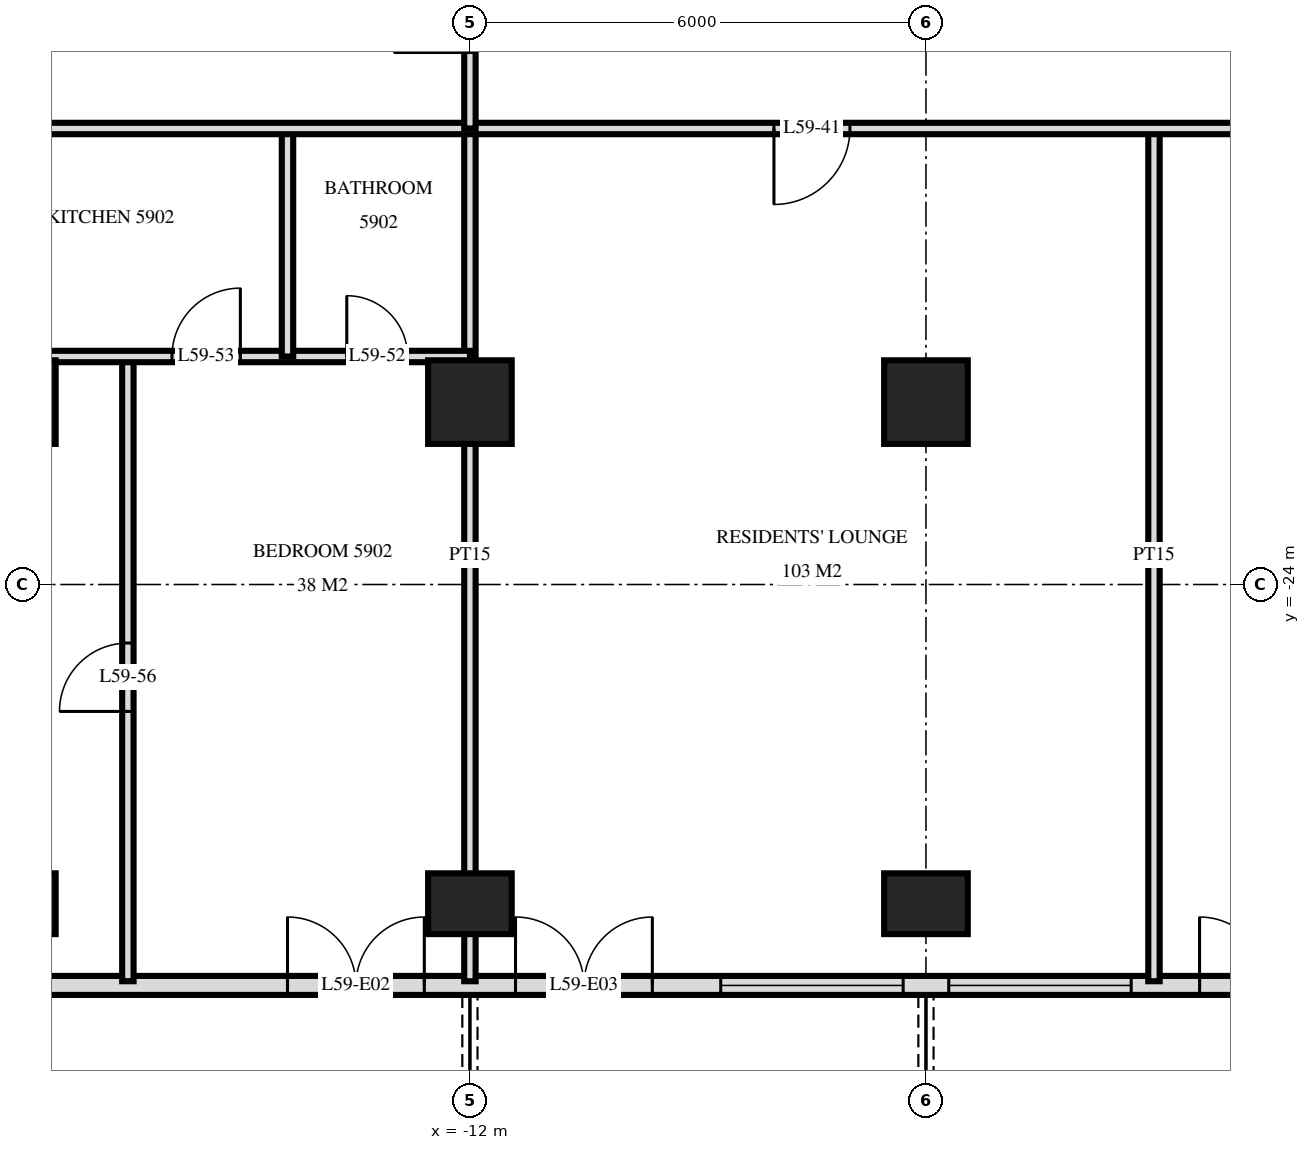
"""IFC4 building model, lengths in metres.
Left out: names, types, materials, properties, quantities, classifications, styles, units other than length and angle.
Written with IfcOpenShell. Run it as: python <this file> out.ifc"""

import sys

from ifc_helpers import new_model, si_unit, direction, frame, frame_2d, origin, origin_2d, place, context, subcontext, project, spatial, rectangle, extrude, element, fill, save


model = new_model("IFC4")
c1 = context("Model", 3, precision=1e-05, world=origin(), true_north=direction((0.0, 1.0)))
c2 = subcontext(c1, "Body", "Model", "MODEL_VIEW")
j1 = project(units=[si_unit("LENGTHUNIT", "METRE"), si_unit("PLANEANGLEUNIT", "RADIAN")], contexts=[c1])
p1 = place(None, origin())
s1 = spatial("IfcSite", under=j1, at=p1, CompositionType="ELEMENT")
p2 = place(p1, origin())
s2 = spatial("IfcBuilding", under=s1, at=p2, CompositionType="ELEMENT")
p3 = place(p2, frame((0.0, 0.0, 225.6)))
s3 = spatial("IfcBuildingStorey", under=s2, at=p3, CompositionType="ELEMENT", Elevation=225.6)
p4 = place(p3, frame((-18.0, -28.2, 0.0), z_axis=(0.0, 0.0, 1.0), x_axis=(1.0, 0.0, 0.0)))
e1 = element("IfcColumn", 1, at=p4, inside=s3, PredefinedType="COLUMN", context=c2, shape_type="SweptSolid", body=[
    extrude(rectangle(XDim=1.1, YDim=0.8, at=origin_2d()), origin(), (0.0, 0.0, 1.0), 3.5),
])
p5 = place(p3, frame((-18.0, -21.6, 0.0), z_axis=(0.0, 0.0, 1.0), x_axis=(1.0, 0.0, 0.0)))
e2 = element("IfcColumn", 2, at=p5, inside=s3, PredefinedType="COLUMN", context=c2, shape_type="SweptSolid", body=[
    extrude(rectangle(XDim=1.1, YDim=1.1, at=origin_2d()), origin(), (0.0, 0.0, 1.0), 3.5),
])
p6 = place(p3, frame((-12.0, -28.2, 0.0), z_axis=(0.0, 0.0, 1.0), x_axis=(1.0, 0.0, 0.0)))
e3 = element("IfcColumn", 3, at=p6, inside=s3, PredefinedType="COLUMN", context=c2, shape_type="SweptSolid", body=[
    extrude(rectangle(XDim=1.1, YDim=0.8, at=origin_2d()), origin(), (0.0, 0.0, 1.0), 3.5),
])
p7 = place(p3, frame((-12.0, -21.6, 0.0), z_axis=(0.0, 0.0, 1.0), x_axis=(1.0, 0.0, 0.0)))
e4 = element("IfcColumn", 4, at=p7, inside=s3, PredefinedType="COLUMN", context=c2, shape_type="SweptSolid", body=[
    extrude(rectangle(XDim=1.1, YDim=1.1, at=origin_2d()), origin(), (0.0, 0.0, 1.0), 3.5),
])
p8 = place(p3, frame((-6.0, -28.2, 0.0), z_axis=(0.0, 0.0, 1.0), x_axis=(1.0, 0.0, 0.0)))
e5 = element("IfcColumn", 5, at=p8, inside=s3, PredefinedType="COLUMN", context=c2, shape_type="SweptSolid", body=[
    extrude(rectangle(XDim=1.1, YDim=0.8, at=origin_2d()), origin(), (0.0, 0.0, 1.0), 3.5),
])
p9 = place(p3, frame((-6.0, -21.6, 0.0), z_axis=(0.0, 0.0, 1.0), x_axis=(1.0, 0.0, 0.0)))
e6 = element("IfcColumn", 6, at=p9, inside=s3, PredefinedType="COLUMN", context=c2, shape_type="SweptSolid", body=[
    extrude(rectangle(XDim=1.1, YDim=1.1, at=origin_2d()), origin(), (0.0, 0.0, 1.0), 3.5),
])
p10 = place(p3, frame((-22.475, -29.275, 0.0), z_axis=(0.0, 0.0, 1.0), x_axis=(1.0, 0.0, 0.0)))
e7 = element("IfcWall", 7, at=p10, inside=s3, PredefinedType="SOLIDWALL", context=c2, shape_type="SweptSolid", body=[
    extrude(rectangle(XDim=44.951, YDim=0.25, at=frame_2d((22.475, 0.0))), origin(), (0.0, 0.0, 1.0), 3.22),
])
p11 = place(p10, frame((0.575, 0.0, 0.0)))
e8 = element("IfcOpeningElement", 8, at=p11, cuts=e7, PredefinedType="OPENING", context=c2, shape_type="SweptSolid", body=[
    extrude(rectangle(XDim=1.8, YDim=2.4, at=frame_2d((0.9, 1.2))), frame((0.0, 0.135, 0.0), z_axis=(0.0, -1.0, 0.0), x_axis=(1.0, 0.0, 0.0)), (0.0, 0.0, 1.0), 0.27),
])
p12 = place(p10, frame((8.075, 0.0, 0.0)))
e9 = element("IfcOpeningElement", 9, at=p12, cuts=e7, PredefinedType="OPENING", context=c2, shape_type="SweptSolid", body=[
    extrude(rectangle(XDim=1.8, YDim=2.4, at=frame_2d((0.9, 1.2))), frame((0.0, 0.135, 0.0), z_axis=(0.0, -1.0, 0.0), x_axis=(1.0, 0.0, 0.0)), (0.0, 0.0, 1.0), 0.27),
])
p13 = place(p10, frame((11.075, 0.0, 0.0)))
e10 = element("IfcOpeningElement", 10, at=p13, cuts=e7, PredefinedType="OPENING", context=c2, shape_type="SweptSolid", body=[
    extrude(rectangle(XDim=1.8, YDim=2.4, at=frame_2d((0.9, 1.2))), frame((0.0, 0.135, 0.0), z_axis=(0.0, -1.0, 0.0), x_axis=(1.0, 0.0, 0.0)), (0.0, 0.0, 1.0), 0.27),
])
p14 = place(p10, frame((13.775, 0.0, 0.9)))
e11 = element("IfcOpeningElement", 11, at=p14, cuts=e7, PredefinedType="OPENING", context=c2, shape_type="SweptSolid", body=[
    extrude(rectangle(XDim=2.4, YDim=1.5, at=frame_2d((1.2, 0.75))), frame((0.0, 0.135, 0.0), z_axis=(0.0, -1.0, 0.0), x_axis=(1.0, 0.0, 0.0)), (0.0, 0.0, 1.0), 0.27),
])
p15 = place(p10, frame((16.775, 0.0, 0.9)))
e12 = element("IfcOpeningElement", 12, at=p15, cuts=e7, PredefinedType="OPENING", context=c2, shape_type="SweptSolid", body=[
    extrude(rectangle(XDim=2.4, YDim=1.5, at=frame_2d((1.2, 0.75))), frame((0.0, 0.135, 0.0), z_axis=(0.0, -1.0, 0.0), x_axis=(1.0, 0.0, 0.0)), (0.0, 0.0, 1.0), 0.27),
])
p16 = place(p10, frame((20.075, 0.0, 0.0)))
e13 = element("IfcOpeningElement", 13, at=p16, cuts=e7, PredefinedType="OPENING", context=c2, shape_type="SweptSolid", body=[
    extrude(rectangle(XDim=1.8, YDim=2.4, at=frame_2d((0.9, 1.2))), frame((0.0, 0.135, 0.0), z_axis=(0.0, -1.0, 0.0), x_axis=(1.0, 0.0, 0.0)), (0.0, 0.0, 1.0), 0.27),
])
p17 = place(p10, frame((23.075, 0.0, 0.0)))
e14 = element("IfcOpeningElement", 14, at=p17, cuts=e7, PredefinedType="OPENING", context=c2, shape_type="SweptSolid", body=[
    extrude(rectangle(XDim=1.8, YDim=2.4, at=frame_2d((0.9, 1.2))), frame((0.0, 0.135, 0.0), z_axis=(0.0, -1.0, 0.0), x_axis=(1.0, 0.0, 0.0)), (0.0, 0.0, 1.0), 0.27),
])
p18 = place(p10, frame((25.775, 0.0, 0.9)))
e15 = element("IfcOpeningElement", 15, at=p18, cuts=e7, PredefinedType="OPENING", context=c2, shape_type="SweptSolid", body=[
    extrude(rectangle(XDim=2.4, YDim=1.5, at=frame_2d((1.2, 0.75))), frame((0.0, 0.135, 0.0), z_axis=(0.0, -1.0, 0.0), x_axis=(1.0, 0.0, 0.0)), (0.0, 0.0, 1.0), 0.27),
])
p19 = place(p10, frame((29.075, 0.0, 0.0)))
e16 = element("IfcOpeningElement", 16, at=p19, cuts=e7, PredefinedType="OPENING", context=c2, shape_type="SweptSolid", body=[
    extrude(rectangle(XDim=1.8, YDim=2.4, at=frame_2d((0.9, 1.2))), frame((0.0, 0.135, 0.0), z_axis=(0.0, -1.0, 0.0), x_axis=(1.0, 0.0, 0.0)), (0.0, 0.0, 1.0), 0.27),
])
p20 = place(p10, frame((31.775, 0.0, 0.9)))
e17 = element("IfcOpeningElement", 17, at=p20, cuts=e7, PredefinedType="OPENING", context=c2, shape_type="SweptSolid", body=[
    extrude(rectangle(XDim=2.4, YDim=1.5, at=frame_2d((1.2, 0.75))), frame((0.0, 0.135, 0.0), z_axis=(0.0, -1.0, 0.0), x_axis=(1.0, 0.0, 0.0)), (0.0, 0.0, 1.0), 0.27),
])
p21 = place(p10, frame((35.075, 0.0, 0.0)))
e18 = element("IfcOpeningElement", 18, at=p21, cuts=e7, PredefinedType="OPENING", context=c2, shape_type="SweptSolid", body=[
    extrude(rectangle(XDim=1.8, YDim=2.4, at=frame_2d((0.9, 1.2))), frame((0.0, 0.135, 0.0), z_axis=(0.0, -1.0, 0.0), x_axis=(1.0, 0.0, 0.0)), (0.0, 0.0, 1.0), 0.27),
])
p22 = place(p10, frame((37.775, 0.0, 0.9)))
e19 = element("IfcOpeningElement", 19, at=p22, cuts=e7, PredefinedType="OPENING", context=c2, shape_type="SweptSolid", body=[
    extrude(rectangle(XDim=2.4, YDim=1.5, at=frame_2d((1.2, 0.75))), frame((0.0, 0.135, 0.0), z_axis=(0.0, -1.0, 0.0), x_axis=(1.0, 0.0, 0.0)), (0.0, 0.0, 1.0), 0.27),
])
p23 = place(p10, frame((41.075, 0.0, 0.0)))
e20 = element("IfcOpeningElement", 20, at=p23, cuts=e7, PredefinedType="OPENING", context=c2, shape_type="SweptSolid", body=[
    extrude(rectangle(XDim=1.8, YDim=2.4, at=frame_2d((0.9, 1.2))), frame((0.0, 0.135, 0.0), z_axis=(0.0, -1.0, 0.0), x_axis=(1.0, 0.0, 0.0)), (0.0, 0.0, 1.0), 0.27),
])
p24 = place(p3, frame((-3.0, -29.22, 0.0), z_axis=(0.0, 0.0, 1.0), x_axis=(0.0, 1.0, 0.0)))
e21 = element("IfcWall", 21, at=p24, inside=s3, PredefinedType="PARTITIONING", context=c2, shape_type="SweptSolid", body=[
    extrude(rectangle(XDim=11.22, YDim=0.15, at=frame_2d((5.61, 0.0))), origin(), (0.0, 0.0, 1.0), 3.22),
])
p25 = place(p3, frame((-12.0, -18.0, 0.0), z_axis=(0.0, 0.0, 1.0), x_axis=(0.0, 1.0, 0.0)))
e22 = element("IfcWall", 22, at=p25, inside=s3, PredefinedType="PARTITIONING", context=c2, shape_type="SweptSolid", body=[
    extrude(rectangle(XDim=2.95, YDim=0.15, at=frame_2d((1.475, 0.0))), origin(), (0.0, 0.0, 1.0), 3.22),
])
p26 = place(p25, frame((1.0, 0.0, 0.0)))
e23 = element("IfcOpeningElement", 23, at=p26, cuts=e22, PredefinedType="OPENING", context=c2, shape_type="SweptSolid", body=[
    extrude(rectangle(XDim=1.0, YDim=2.1, at=frame_2d((0.5, 1.05))), frame((0.0, 0.085, 0.0), z_axis=(0.0, -1.0, 0.0), x_axis=(1.0, 0.0, 0.0)), (0.0, 0.0, 1.0), 0.17),
])
p27 = place(p3, frame((-12.0, -29.22, 0.0), z_axis=(0.0, 0.0, 1.0), x_axis=(0.0, 1.0, 0.0)))
e24 = element("IfcWall", 24, at=p27, inside=s3, PredefinedType="PARTITIONING", context=c2, shape_type="SweptSolid", body=[
    extrude(rectangle(XDim=11.22, YDim=0.15, at=frame_2d((5.61, 0.0))), origin(), (0.0, 0.0, 1.0), 3.22),
])
p28 = place(p3, frame((-14.4, -21.0, 0.0), z_axis=(0.0, 0.0, 1.0), x_axis=(0.0, 1.0, 0.0)))
e25 = element("IfcWall", 25, at=p28, inside=s3, PredefinedType="PARTITIONING", context=c2, shape_type="SweptSolid", body=[
    extrude(rectangle(XDim=3.0, YDim=0.15, at=frame_2d((1.5, 0.0))), origin(), (0.0, 0.0, 1.0), 3.22),
])
p29 = place(p3, frame((-16.5, -29.22, 0.0), z_axis=(0.0, 0.0, 1.0), x_axis=(0.0, 1.0, 0.0)))
e26 = element("IfcWall", 26, at=p29, inside=s3, PredefinedType="PARTITIONING", context=c2, shape_type="SweptSolid", body=[
    extrude(rectangle(XDim=8.22, YDim=0.15, at=frame_2d((4.11, 0.0))), origin(), (0.0, 0.0, 1.0), 3.22),
])
p30 = place(p29, frame((3.55, 0.0, 0.0)))
e27 = element("IfcOpeningElement", 27, at=p30, cuts=e26, PredefinedType="OPENING", context=c2, shape_type="SweptSolid", body=[
    extrude(rectangle(XDim=0.9, YDim=2.1, at=frame_2d((0.45, 1.05))), frame((0.0, 0.085, 0.0), z_axis=(0.0, -1.0, 0.0), x_axis=(1.0, 0.0, 0.0)), (0.0, 0.0, 1.0), 0.17),
])
p31 = place(p3, frame((-20.4, -21.0, 0.0), z_axis=(0.0, 0.0, 1.0), x_axis=(1.0, 0.0, 0.0)))
e28 = element("IfcWall", 28, at=p31, inside=s3, PredefinedType="PARTITIONING", context=c2, shape_type="SweptSolid", body=[
    extrude(rectangle(XDim=8.4, YDim=0.15, at=frame_2d((4.2, 0.0))), origin(), (0.0, 0.0, 1.0), 3.22),
])
p32 = place(p31, frame((6.78, 0.0, 0.0)))
e29 = element("IfcOpeningElement", 29, at=p32, cuts=e28, PredefinedType="OPENING", context=c2, shape_type="SweptSolid", body=[
    extrude(rectangle(XDim=0.8, YDim=2.1, at=frame_2d((0.4, 1.05))), frame((0.0, 0.085, 0.0), z_axis=(0.0, -1.0, 0.0), x_axis=(1.0, 0.0, 0.0)), (0.0, 0.0, 1.0), 0.17),
])
p33 = place(p31, frame((4.48, 0.0, 0.0)))
e30 = element("IfcOpeningElement", 30, at=p33, cuts=e28, PredefinedType="OPENING", context=c2, shape_type="SweptSolid", body=[
    extrude(rectangle(XDim=0.9, YDim=2.1, at=frame_2d((0.45, 1.05))), frame((0.0, 0.085, 0.0), z_axis=(0.0, -1.0, 0.0), x_axis=(1.0, 0.0, 0.0)), (0.0, 0.0, 1.0), 0.17),
])
p34 = place(p3, frame((-26.82, -18.0, 0.0), z_axis=(0.0, 0.0, 1.0), x_axis=(1.0, 0.0, 0.0)))
e31 = element("IfcWall", 31, at=p34, inside=s3, PredefinedType="PARTITIONING", context=c2, shape_type="SweptSolid", body=[
    extrude(rectangle(XDim=53.64, YDim=0.15, at=frame_2d((26.82, 0.0))), origin(), (0.0, 0.0, 1.0), 3.22),
])
p35 = place(p34, frame((4.92, 0.0, 0.0)))
e32 = element("IfcOpeningElement", 32, at=p35, cuts=e31, PredefinedType="OPENING", context=c2, shape_type="SweptSolid", body=[
    extrude(rectangle(XDim=1.0, YDim=2.1, at=frame_2d((0.5, 1.05))), frame((0.0, 0.085, 0.0), z_axis=(0.0, -1.0, 0.0), x_axis=(1.0, 0.0, 0.0)), (0.0, 0.0, 1.0), 0.17),
])
p36 = place(p34, frame((1.62, 0.0, 0.0)))
e33 = element("IfcOpeningElement", 33, at=p36, cuts=e31, PredefinedType="OPENING", context=c2, shape_type="SweptSolid", body=[
    extrude(rectangle(XDim=1.0, YDim=2.1, at=frame_2d((0.5, 1.05))), frame((0.0, 0.085, 0.0), z_axis=(0.0, -1.0, 0.0), x_axis=(1.0, 0.0, 0.0)), (0.0, 0.0, 1.0), 0.17),
])
p37 = place(p34, frame((38.97, 0.0, 0.0)))
e34 = element("IfcOpeningElement", 34, at=p37, cuts=e31, PredefinedType="OPENING", context=c2, shape_type="SweptSolid", body=[
    extrude(rectangle(XDim=1.0, YDim=2.1, at=frame_2d((0.5, 1.05))), frame((0.0, 0.085, 0.0), z_axis=(0.0, -1.0, 0.0), x_axis=(1.0, 0.0, 0.0)), (0.0, 0.0, 1.0), 0.17),
])
p38 = place(p34, frame((48.72, 0.0, 0.0)))
e35 = element("IfcOpeningElement", 35, at=p38, cuts=e31, PredefinedType="OPENING", context=c2, shape_type="SweptSolid", body=[
    extrude(rectangle(XDim=1.0, YDim=2.1, at=frame_2d((0.5, 1.05))), frame((0.0, 0.085, 0.0), z_axis=(0.0, -1.0, 0.0), x_axis=(1.0, 0.0, 0.0)), (0.0, 0.0, 1.0), 0.17),
])
p39 = place(p34, frame((46.92, 0.0, 0.0)))
e36 = element("IfcOpeningElement", 36, at=p39, cuts=e31, PredefinedType="OPENING", context=c2, shape_type="SweptSolid", body=[
    extrude(rectangle(XDim=1.0, YDim=2.1, at=frame_2d((0.5, 1.05))), frame((0.0, 0.085, 0.0), z_axis=(0.0, -1.0, 0.0), x_axis=(1.0, 0.0, 0.0)), (0.0, 0.0, 1.0), 0.17),
])
p40 = place(p34, frame((18.82, 0.0, 0.0)))
e37 = element("IfcOpeningElement", 37, at=p40, cuts=e31, PredefinedType="OPENING", context=c2, shape_type="SweptSolid", body=[
    extrude(rectangle(XDim=1.0, YDim=2.1, at=frame_2d((0.5, 1.05))), frame((0.0, 0.085, 0.0), z_axis=(0.0, -1.0, 0.0), x_axis=(1.0, 0.0, 0.0)), (0.0, 0.0, 1.0), 0.17),
])
p41 = place(p34, frame((27.82, 0.0, 0.0)))
e38 = element("IfcOpeningElement", 38, at=p41, cuts=e31, PredefinedType="OPENING", context=c2, shape_type="SweptSolid", body=[
    extrude(rectangle(XDim=1.0, YDim=2.1, at=frame_2d((0.5, 1.05))), frame((0.0, 0.085, 0.0), z_axis=(0.0, -1.0, 0.0), x_axis=(1.0, 0.0, 0.0)), (0.0, 0.0, 1.0), 0.17),
])
p42 = place(p34, frame((35.32, 0.0, 0.0)))
e39 = element("IfcOpeningElement", 39, at=p42, cuts=e31, PredefinedType="OPENING", context=c2, shape_type="SweptSolid", body=[
    extrude(rectangle(XDim=1.0, YDim=2.1, at=frame_2d((0.5, 1.05))), frame((0.0, 0.085, 0.0), z_axis=(0.0, -1.0, 0.0), x_axis=(1.0, 0.0, 0.0)), (0.0, 0.0, 1.0), 0.17),
])
p43 = place(p12, origin())
e40 = element("IfcDoor", 40, at=p43, inside=s3, OperationType="DOUBLE_DOOR_SINGLE_SWING", PredefinedType="DOOR", context=c2, shape_type="SweptSolid", body=[
    extrude(rectangle(XDim=1.8, YDim=2.4, at=frame_2d((0.9, 1.2))), frame((0.0, 0.025, 0.0), z_axis=(0.0, -1.0, 0.0), x_axis=(1.0, 0.0, 0.0)), (0.0, 0.0, 1.0), 0.05),
])
fill(e9, e40)
p44 = place(p13, origin())
e41 = element("IfcDoor", 41, at=p44, inside=s3, OperationType="DOUBLE_DOOR_SINGLE_SWING", PredefinedType="DOOR", context=c2, shape_type="SweptSolid", body=[
    extrude(rectangle(XDim=1.8, YDim=2.4, at=frame_2d((0.9, 1.2))), frame((0.0, 0.025, 0.0), z_axis=(0.0, -1.0, 0.0), x_axis=(1.0, 0.0, 0.0)), (0.0, 0.0, 1.0), 0.05),
])
fill(e10, e41)
p45 = place(p14, origin())
e42 = element("IfcWindow", 42, at=p45, inside=s3, PartitioningType="SINGLE_PANEL", PredefinedType="WINDOW", context=c2, shape_type="SweptSolid", body=[
    extrude(rectangle(XDim=2.4, YDim=1.5, at=frame_2d((1.2, 0.75))), frame((0.0, 0.03, 0.0), z_axis=(0.0, -1.0, 0.0), x_axis=(1.0, 0.0, 0.0)), (0.0, 0.0, 1.0), 0.06),
])
fill(e11, e42)
p46 = place(p15, origin())
e43 = element("IfcWindow", 43, at=p46, inside=s3, PartitioningType="SINGLE_PANEL", PredefinedType="WINDOW", context=c2, shape_type="SweptSolid", body=[
    extrude(rectangle(XDim=2.4, YDim=1.5, at=frame_2d((1.2, 0.75))), frame((0.0, 0.03, 0.0), z_axis=(0.0, -1.0, 0.0), x_axis=(1.0, 0.0, 0.0)), (0.0, 0.0, 1.0), 0.06),
])
fill(e12, e43)
p47 = place(p16, origin())
e44 = element("IfcDoor", 44, at=p47, inside=s3, OperationType="DOUBLE_DOOR_SINGLE_SWING", PredefinedType="DOOR", context=c2, shape_type="SweptSolid", body=[
    extrude(rectangle(XDim=1.8, YDim=2.4, at=frame_2d((0.9, 1.2))), frame((0.0, 0.025, 0.0), z_axis=(0.0, -1.0, 0.0), x_axis=(1.0, 0.0, 0.0)), (0.0, 0.0, 1.0), 0.05),
])
fill(e13, e44)
p48 = place(p40, frame((0.5, 0.0, 0.0), z_axis=(0.0, 0.0, 1.0), x_axis=(-1.0, 0.0, 0.0)))
e45 = element("IfcDoor", 45, at=p48, inside=s3, OperationType="SINGLE_SWING_LEFT", PredefinedType="DOOR", context=c2, shape_type="SweptSolid", body=[
    extrude(rectangle(XDim=1.0, YDim=2.1, at=frame_2d((0.0, 1.05))), frame((0.0, -0.025, 0.0), z_axis=(0.0, 1.0, 0.0), x_axis=(-1.0, 0.0, 0.0)), (0.0, 0.0, 1.0), 0.05),
])
fill(e37, e45)
p49 = place(p32, origin())
e46 = element("IfcDoor", 46, at=p49, inside=s3, OperationType="SINGLE_SWING_RIGHT", PredefinedType="DOOR", context=c2, shape_type="SweptSolid", body=[
    extrude(rectangle(XDim=0.8, YDim=2.1, at=frame_2d((0.4, 1.05))), frame((0.0, 0.025, 0.0), z_axis=(0.0, -1.0, 0.0), x_axis=(1.0, 0.0, 0.0)), (0.0, 0.0, 1.0), 0.05),
])
fill(e29, e46)
p50 = place(p33, origin())
e47 = element("IfcDoor", 47, at=p50, inside=s3, OperationType="SINGLE_SWING_LEFT", PredefinedType="DOOR", context=c2, shape_type="SweptSolid", body=[
    extrude(rectangle(XDim=0.9, YDim=2.1, at=frame_2d((0.45, 1.05))), frame((0.0, 0.025, 0.0), z_axis=(0.0, -1.0, 0.0), x_axis=(1.0, 0.0, 0.0)), (0.0, 0.0, 1.0), 0.05),
])
fill(e30, e47)
p51 = place(p30, origin())
e48 = element("IfcDoor", 48, at=p51, inside=s3, OperationType="SINGLE_SWING_RIGHT", PredefinedType="DOOR", context=c2, shape_type="SweptSolid", body=[
    extrude(rectangle(XDim=0.9, YDim=2.1, at=frame_2d((0.45, 1.05))), frame((0.0, 0.025, 0.0), z_axis=(0.0, -1.0, 0.0), x_axis=(1.0, 0.0, 0.0)), (0.0, 0.0, 1.0), 0.05),
])
fill(e27, e48)
save(model, sys.argv[1])
